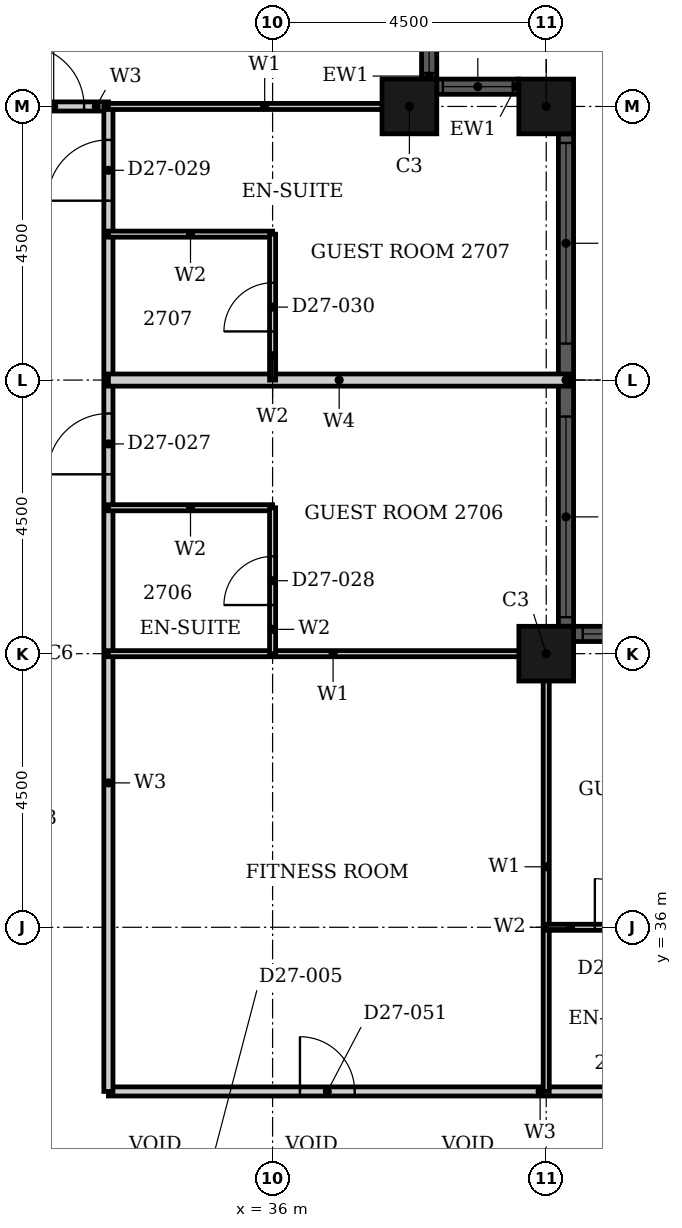
"""IFC4 building model, lengths in metres.
Left out: names, types, materials, properties, quantities, classifications, styles, units other than length and angle.
Written with IfcOpenShell. Run it as: python <this file> out.ifc"""

import sys

from ifc_helpers import new_model, si_unit, direction, frame, frame_2d, origin, origin_2d, place, context, subcontext, project, spatial, rectangle, hollow_rectangle, extrude, element, fill, save


model = new_model("IFC4")
c1 = context("Model", 3, precision=1e-05, world=origin(), true_north=direction((0.0, 1.0)))
c2 = subcontext(c1, "Body", "Model", "MODEL_VIEW")
j1 = project(units=[si_unit("LENGTHUNIT", "METRE"), si_unit("PLANEANGLEUNIT", "RADIAN")], contexts=[c1])
p1 = place(None, origin())
s1 = spatial("IfcSite", under=j1, at=p1, CompositionType="ELEMENT")
p2 = place(p1, origin())
s2 = spatial("IfcBuilding", under=s1, at=p2, CompositionType="ELEMENT")
p3 = place(p2, frame((0.0, 0.0, 111.6)))
s3 = spatial("IfcBuildingStorey", under=s2, at=p3, CompositionType="ELEMENT", Elevation=111.6)
for number, where, z_axis, x_axis in (
    (1, (40.5, 40.5, 0.0), (0.0, 0.0, 1.0), (1.0, 0.0, 0.0)),
    (2, (40.5, 49.5, 0.0), (0.0, 0.0, 1.0), (1.0, 0.0, 0.0)),
    (3, (38.25, 49.5, 0.0), (0.0, 0.0, 1.0), (1.0, 0.0, 0.0)),
):
    element("IfcColumn", number, at=place(p3, frame(where, z_axis=z_axis, x_axis=x_axis)), inside=s3, PredefinedType="COLUMN", context=c2, shape_type="SweptSolid", body=[
        extrude(hollow_rectangle(XDim=0.9, YDim=0.9, WallThickness=0.028, at=origin_2d()), origin(), (0.0, 0.0, 1.0), 3.6),
    ])
p4 = place(p3, frame((44.55, 40.825, 0.0), z_axis=(0.0, 0.0, 1.0), x_axis=(-1.0, 0.0, 0.0)))
e4 = element("IfcWall", 4, at=p4, inside=s3, PredefinedType="SOLIDWALL", context=c2, shape_type="SweptSolid", body=[
    extrude(rectangle(XDim=3.6, YDim=0.25, at=frame_2d((1.8, 0.0))), origin(), (0.0, 0.0, 1.0), 3.6),
])
p5 = place(p4, frame((0.15, 0.0, 0.9)))
e5 = element("IfcOpeningElement", 5, at=p5, cuts=e4, PredefinedType="OPENING", context=c2, shape_type="SweptSolid", body=[
    extrude(rectangle(XDim=3.3, YDim=2.08, at=frame_2d((1.65, 1.04))), frame((0.0, 0.135, 0.0), z_axis=(0.0, -1.0, 0.0), x_axis=(1.0, 0.0, 0.0)), (0.0, 0.0, 1.0), 0.27),
])
p6 = place(p3, frame((40.825, 40.95, 0.0), z_axis=(0.0, 0.0, 1.0), x_axis=(0.0, 1.0, 0.0)))
e6 = element("IfcWall", 6, at=p6, inside=s3, PredefinedType="SOLIDWALL", context=c2, shape_type="SweptSolid", body=[
    extrude(rectangle(XDim=8.1, YDim=0.25, at=frame_2d((4.05, 0.0))), origin(), (0.0, 0.0, 1.0), 3.6),
])
p7 = place(p6, frame((0.15, 0.0, 0.9)))
e7 = element("IfcOpeningElement", 7, at=p7, cuts=e6, PredefinedType="OPENING", context=c2, shape_type="SweptSolid", body=[
    extrude(rectangle(XDim=3.3, YDim=2.08, at=frame_2d((1.65, 1.04))), frame((0.0, 0.135, 0.0), z_axis=(0.0, -1.0, 0.0), x_axis=(1.0, 0.0, 0.0)), (0.0, 0.0, 1.0), 0.27),
])
p8 = place(p6, frame((4.65, 0.0, 0.9)))
e8 = element("IfcOpeningElement", 8, at=p8, cuts=e6, PredefinedType="OPENING", context=c2, shape_type="SweptSolid", body=[
    extrude(rectangle(XDim=3.3, YDim=2.08, at=frame_2d((1.65, 1.04))), frame((0.0, 0.135, 0.0), z_axis=(0.0, -1.0, 0.0), x_axis=(1.0, 0.0, 0.0)), (0.0, 0.0, 1.0), 0.27),
])
p9 = place(p3, frame((40.05, 49.825, 0.0), z_axis=(0.0, 0.0, 1.0), x_axis=(-1.0, 0.0, 0.0)))
e9 = element("IfcWall", 9, at=p9, inside=s3, PredefinedType="SOLIDWALL", context=c2, shape_type="SweptSolid", body=[
    extrude(rectangle(XDim=1.35, YDim=0.25, at=frame_2d((0.675, 0.0))), origin(), (0.0, 0.0, 1.0), 3.6),
])
p10 = place(p9, frame((0.1, 0.0, 0.9)))
e10 = element("IfcOpeningElement", 10, at=p10, cuts=e9, PredefinedType="OPENING", context=c2, shape_type="SweptSolid", body=[
    extrude(rectangle(XDim=1.15, YDim=2.08, at=frame_2d((0.575, 1.04))), frame((0.0, 0.135, 0.0), z_axis=(0.0, -1.0, 0.0), x_axis=(1.0, 0.0, 0.0)), (0.0, 0.0, 1.0), 0.27),
])
p11 = place(p3, frame((38.575, 49.95, 0.0), z_axis=(0.0, 0.0, 1.0), x_axis=(0.0, 1.0, 0.0)))
e11 = element("IfcWall", 11, at=p11, inside=s3, PredefinedType="SOLIDWALL", context=c2, shape_type="SweptSolid", body=[
    extrude(rectangle(XDim=1.35, YDim=0.25, at=frame_2d((0.675, 0.0))), origin(), (0.0, 0.0, 1.0), 3.6),
])
p12 = place(p11, frame((0.1, 0.0, 0.9)))
e12 = element("IfcOpeningElement", 12, at=p12, cuts=e11, PredefinedType="OPENING", context=c2, shape_type="SweptSolid", body=[
    extrude(rectangle(XDim=1.15, YDim=2.08, at=frame_2d((0.575, 1.04))), frame((0.0, 0.135, 0.0), z_axis=(0.0, -1.0, 0.0), x_axis=(1.0, 0.0, 0.0)), (0.0, 0.0, 1.0), 0.27),
])
p13 = place(p3, frame((33.3, 33.3, 0.0), z_axis=(0.0, 0.0, 1.0), x_axis=(1.0, 0.0, 0.0)))
e13 = element("IfcWall", 13, at=p13, inside=s3, PredefinedType="PARTITIONING", context=c2, shape_type="SweptSolid", body=[
    extrude(rectangle(XDim=11.7, YDim=0.15, at=frame_2d((5.85, 0.0))), origin(), (0.0, 0.0, 1.0), 3.3),
])
p14 = place(p13, frame((10.15, 0.0, 0.0)))
e14 = element("IfcOpeningElement", 14, at=p14, cuts=e13, PredefinedType="OPENING", context=c2, shape_type="SweptSolid", body=[
    extrude(rectangle(XDim=1.0, YDim=2.1, at=frame_2d((0.5, 1.05))), frame((0.0, 0.085, 0.0), z_axis=(0.0, -1.0, 0.0), x_axis=(1.0, 0.0, 0.0)), (0.0, 0.0, 1.0), 0.17),
])
p15 = place(p13, frame((3.15, 0.0, 0.0)))
e15 = element("IfcOpeningElement", 15, at=p15, cuts=e13, PredefinedType="OPENING", context=c2, shape_type="SweptSolid", body=[
    extrude(rectangle(XDim=0.9, YDim=2.1, at=frame_2d((0.45, 1.05))), frame((0.0, 0.085, 0.0), z_axis=(0.0, -1.0, 0.0), x_axis=(1.0, 0.0, 0.0)), (0.0, 0.0, 1.0), 0.17),
])
p16 = place(p3, frame((31.5, 49.5, 0.0), z_axis=(0.0, 0.0, 1.0), x_axis=(1.0, 0.0, 0.0)))
e16 = element("IfcWall", 16, at=p16, inside=s3, PredefinedType="PARTITIONING", context=c2, shape_type="SweptSolid", body=[
    extrude(rectangle(XDim=1.8, YDim=0.15, at=frame_2d((0.9, 0.0))), origin(), (0.0, 0.0, 1.0), 3.3),
])
p17 = place(p16, frame((0.4, 0.0, 0.0)))
e17 = element("IfcOpeningElement", 17, at=p17, cuts=e16, PredefinedType="OPENING", context=c2, shape_type="SweptSolid", body=[
    extrude(rectangle(XDim=1.0, YDim=2.1, at=frame_2d((0.5, 1.05))), frame((0.0, 0.085, 0.0), z_axis=(0.0, -1.0, 0.0), x_axis=(1.0, 0.0, 0.0)), (0.0, 0.0, 1.0), 0.17),
])
p18 = place(p3, frame((33.3, 33.3, 0.0), z_axis=(0.0, 0.0, 1.0), x_axis=(0.0, 1.0, 0.0)))
e18 = element("IfcWall", 18, at=p18, inside=s3, PredefinedType="PARTITIONING", context=c2, shape_type="SweptSolid", body=[
    extrude(rectangle(XDim=16.2, YDim=0.15, at=frame_2d((8.1, 0.0))), origin(), (0.0, 0.0, 1.0), 3.3),
])
p19 = place(p18, frame((10.15, 0.0, 0.0)))
e19 = element("IfcOpeningElement", 19, at=p19, cuts=e18, PredefinedType="OPENING", context=c2, shape_type="SweptSolid", body=[
    extrude(rectangle(XDim=1.0, YDim=2.1, at=frame_2d((0.5, 1.05))), frame((0.0, 0.085, 0.0), z_axis=(0.0, -1.0, 0.0), x_axis=(1.0, 0.0, 0.0)), (0.0, 0.0, 1.0), 0.17),
])
p20 = place(p18, frame((14.65, 0.0, 0.0)))
e20 = element("IfcOpeningElement", 20, at=p20, cuts=e18, PredefinedType="OPENING", context=c2, shape_type="SweptSolid", body=[
    extrude(rectangle(XDim=1.0, YDim=2.1, at=frame_2d((0.5, 1.05))), frame((0.0, 0.085, 0.0), z_axis=(0.0, -1.0, 0.0), x_axis=(1.0, 0.0, 0.0)), (0.0, 0.0, 1.0), 0.17),
])
p21 = place(p3, frame((33.3, 40.5, 0.0), z_axis=(0.0, 0.0, 1.0), x_axis=(1.0, 0.0, 0.0)))
e21 = element("IfcWall", 21, at=p21, inside=s3, PredefinedType="PARTITIONING", context=c2, shape_type="SweptSolid", body=[
    extrude(rectangle(XDim=7.39, YDim=0.1, at=frame_2d((3.695, 0.0))), origin(), (0.0, 0.0, 1.0), 2.38),
])
p22 = place(p3, frame((33.3, 49.5, 0.0), z_axis=(0.0, 0.0, 1.0), x_axis=(1.0, 0.0, 0.0)))
e22 = element("IfcWall", 22, at=p22, inside=s3, PredefinedType="PARTITIONING", context=c2, shape_type="SweptSolid", body=[
    extrude(rectangle(XDim=5.14, YDim=0.1, at=frame_2d((2.57, 0.0))), origin(), (0.0, 0.0, 1.0), 3.3),
])
p23 = place(p3, frame((40.5, 33.3, 0.0), z_axis=(0.0, 0.0, 1.0), x_axis=(0.0, 1.0, 0.0)))
e23 = element("IfcWall", 23, at=p23, inside=s3, PredefinedType="PARTITIONING", context=c2, shape_type="SweptSolid", body=[
    extrude(rectangle(XDim=7.39, YDim=0.1, at=frame_2d((3.695, 0.0))), origin(), (0.0, 0.0, 1.0), 3.3),
])
p24 = place(p3, frame((33.3, 45.0, 0.0), z_axis=(0.0, 0.0, 1.0), x_axis=(1.0, 0.0, 0.0)))
e24 = element("IfcWall", 24, at=p24, inside=s3, PredefinedType="PARTITIONING", context=c2, shape_type="SweptSolid", body=[
    extrude(rectangle(XDim=7.59, YDim=0.2, at=frame_2d((3.795, 0.0))), origin(), (0.0, 0.0, 1.0), 3.3),
])
p25 = place(p3, frame((40.5, 36.0, 0.0), z_axis=(0.0, 0.0, 1.0), x_axis=(1.0, 0.0, 0.0)))
e25 = element("IfcWall", 25, at=p25, inside=s3, PredefinedType="PARTITIONING", context=c2, shape_type="SweptSolid", body=[
    extrude(rectangle(XDim=2.4, YDim=0.1, at=frame_2d((1.2, 0.0))), origin(), (0.0, 0.0, 1.0), 3.3),
])
p26 = place(p25, frame((0.8, 0.0, 0.0)))
e26 = element("IfcOpeningElement", 26, at=p26, cuts=e25, PredefinedType="OPENING", context=c2, shape_type="SweptSolid", body=[
    extrude(rectangle(XDim=0.8, YDim=2.1, at=frame_2d((0.4, 1.05))), frame((0.0, 0.06, 0.0), z_axis=(0.0, -1.0, 0.0), x_axis=(1.0, 0.0, 0.0)), (0.0, 0.0, 1.0), 0.12),
])
for number, where, z_axis, x_axis in (
    (27, (33.3, 42.9, 0.0), (0.0, 0.0, 1.0), (1.0, 0.0, 0.0)),
    (28, (33.3, 47.4, 0.0), (0.0, 0.0, 1.0), (1.0, 0.0, 0.0)),
):
    element("IfcWall", number, at=place(p3, frame(where, z_axis=z_axis, x_axis=x_axis)), inside=s3, PredefinedType="PARTITIONING", context=c2, shape_type="SweptSolid", body=[
        extrude(rectangle(XDim=2.7, YDim=0.1, at=frame_2d((1.35, 0.0))), origin(), (0.0, 0.0, 1.0), 3.3),
    ])
p27 = place(p3, frame((36.0, 40.5, 0.0), z_axis=(0.0, 0.0, 1.0), x_axis=(0.0, 1.0, 0.0)))
e29 = element("IfcWall", 29, at=p27, inside=s3, PredefinedType="PARTITIONING", context=c2, shape_type="SweptSolid", body=[
    extrude(rectangle(XDim=2.4, YDim=0.1, at=frame_2d((1.2, 0.0))), origin(), (0.0, 0.0, 1.0), 2.58),
])
p28 = place(p27, frame((0.8, 0.0, 0.0)))
e30 = element("IfcOpeningElement", 30, at=p28, cuts=e29, PredefinedType="OPENING", context=c2, shape_type="SweptSolid", body=[
    extrude(rectangle(XDim=0.8, YDim=2.1, at=frame_2d((0.4, 1.05))), frame((0.0, 0.06, 0.0), z_axis=(0.0, -1.0, 0.0), x_axis=(1.0, 0.0, 0.0)), (0.0, 0.0, 1.0), 0.12),
])
p29 = place(p3, frame((36.0, 45.0, 0.0), z_axis=(0.0, 0.0, 1.0), x_axis=(0.0, 1.0, 0.0)))
e31 = element("IfcWall", 31, at=p29, inside=s3, PredefinedType="PARTITIONING", context=c2, shape_type="SweptSolid", body=[
    extrude(rectangle(XDim=2.4, YDim=0.1, at=frame_2d((1.2, 0.0))), origin(), (0.0, 0.0, 1.0), 2.58),
])
p30 = place(p29, frame((0.8, 0.0, 0.0)))
e32 = element("IfcOpeningElement", 32, at=p30, cuts=e31, PredefinedType="OPENING", context=c2, shape_type="SweptSolid", body=[
    extrude(rectangle(XDim=0.8, YDim=2.1, at=frame_2d((0.4, 1.05))), frame((0.0, 0.06, 0.0), z_axis=(0.0, -1.0, 0.0), x_axis=(1.0, 0.0, 0.0)), (0.0, 0.0, 1.0), 0.12),
])
p31 = place(p5, origin())
e33 = element("IfcWindow", 33, at=p31, inside=s3, PartitioningType="SINGLE_PANEL", PredefinedType="WINDOW", context=c2, shape_type="SweptSolid", body=[
    extrude(rectangle(XDim=3.3, YDim=2.08, at=frame_2d((1.65, 1.04))), frame((0.0, 0.03, 0.0), z_axis=(0.0, -1.0, 0.0), x_axis=(1.0, 0.0, 0.0)), (0.0, 0.0, 1.0), 0.06),
])
fill(e5, e33)
p32 = place(p7, origin())
e34 = element("IfcWindow", 34, at=p32, inside=s3, PartitioningType="SINGLE_PANEL", PredefinedType="WINDOW", context=c2, shape_type="SweptSolid", body=[
    extrude(rectangle(XDim=3.3, YDim=2.08, at=frame_2d((1.65, 1.04))), frame((0.0, 0.03, 0.0), z_axis=(0.0, -1.0, 0.0), x_axis=(1.0, 0.0, 0.0)), (0.0, 0.0, 1.0), 0.06),
])
fill(e7, e34)
p33 = place(p8, origin())
e35 = element("IfcWindow", 35, at=p33, inside=s3, PartitioningType="SINGLE_PANEL", PredefinedType="WINDOW", context=c2, shape_type="SweptSolid", body=[
    extrude(rectangle(XDim=3.3, YDim=2.08, at=frame_2d((1.65, 1.04))), frame((0.0, 0.03, 0.0), z_axis=(0.0, -1.0, 0.0), x_axis=(1.0, 0.0, 0.0)), (0.0, 0.0, 1.0), 0.06),
])
fill(e8, e35)
p34 = place(p10, origin())
e36 = element("IfcWindow", 36, at=p34, inside=s3, PartitioningType="SINGLE_PANEL", PredefinedType="WINDOW", context=c2, shape_type="SweptSolid", body=[
    extrude(rectangle(XDim=1.15, YDim=2.08, at=frame_2d((0.575, 1.04))), frame((0.0, 0.03, 0.0), z_axis=(0.0, -1.0, 0.0), x_axis=(1.0, 0.0, 0.0)), (0.0, 0.0, 1.0), 0.06),
])
fill(e10, e36)
p35 = place(p12, origin())
e37 = element("IfcWindow", 37, at=p35, inside=s3, PartitioningType="SINGLE_PANEL", PredefinedType="WINDOW", context=c2, shape_type="SweptSolid", body=[
    extrude(rectangle(XDim=1.15, YDim=2.08, at=frame_2d((0.575, 1.04))), frame((0.0, 0.03, 0.0), z_axis=(0.0, -1.0, 0.0), x_axis=(1.0, 0.0, 0.0)), (0.0, 0.0, 1.0), 0.06),
])
fill(e12, e37)
p36 = place(p19, origin())
e38 = element("IfcDoor", 38, at=p36, inside=s3, OperationType="SINGLE_SWING_RIGHT", PredefinedType="DOOR", context=c2, shape_type="SweptSolid", body=[
    extrude(rectangle(XDim=1.0, YDim=2.1, at=frame_2d((0.5, 1.05))), frame((0.0, 0.025, 0.0), z_axis=(0.0, -1.0, 0.0), x_axis=(1.0, 0.0, 0.0)), (0.0, 0.0, 1.0), 0.05),
])
fill(e19, e38)
p37 = place(p28, origin())
e39 = element("IfcDoor", 39, at=p37, inside=s3, OperationType="SINGLE_SWING_LEFT", PredefinedType="DOOR", context=c2, shape_type="SweptSolid", body=[
    extrude(rectangle(XDim=0.8, YDim=2.1, at=frame_2d((0.4, 1.05))), frame((0.0, 0.025, 0.0), z_axis=(0.0, -1.0, 0.0), x_axis=(1.0, 0.0, 0.0)), (0.0, 0.0, 1.0), 0.05),
])
fill(e30, e39)
p38 = place(p20, origin())
e40 = element("IfcDoor", 40, at=p38, inside=s3, OperationType="SINGLE_SWING_RIGHT", PredefinedType="DOOR", context=c2, shape_type="SweptSolid", body=[
    extrude(rectangle(XDim=1.0, YDim=2.1, at=frame_2d((0.5, 1.05))), frame((0.0, 0.025, 0.0), z_axis=(0.0, -1.0, 0.0), x_axis=(1.0, 0.0, 0.0)), (0.0, 0.0, 1.0), 0.05),
])
fill(e20, e40)
p39 = place(p30, origin())
e41 = element("IfcDoor", 41, at=p39, inside=s3, OperationType="SINGLE_SWING_RIGHT", PredefinedType="DOOR", context=c2, shape_type="SweptSolid", body=[
    extrude(rectangle(XDim=0.8, YDim=2.1, at=frame_2d((0.4, 1.05))), frame((0.0, 0.025, 0.0), z_axis=(0.0, -1.0, 0.0), x_axis=(1.0, 0.0, 0.0)), (0.0, 0.0, 1.0), 0.05),
])
fill(e32, e41)
p40 = place(p17, origin())
e42 = element("IfcDoor", 42, at=p40, inside=s3, OperationType="SINGLE_SWING_LEFT", PredefinedType="DOOR", context=c2, shape_type="SweptSolid", body=[
    extrude(rectangle(XDim=1.0, YDim=2.1, at=frame_2d((0.5, 1.05))), frame((0.0, 0.025, 0.0), z_axis=(0.0, -1.0, 0.0), x_axis=(1.0, 0.0, 0.0)), (0.0, 0.0, 1.0), 0.05),
])
fill(e17, e42)
p41 = place(p26, origin())
e43 = element("IfcDoor", 43, at=p41, inside=s3, OperationType="SINGLE_SWING_LEFT", PredefinedType="DOOR", context=c2, shape_type="SweptSolid", body=[
    extrude(rectangle(XDim=0.8, YDim=2.1, at=frame_2d((0.4, 1.05))), frame((0.0, 0.025, 0.0), z_axis=(0.0, -1.0, 0.0), x_axis=(1.0, 0.0, 0.0)), (0.0, 0.0, 1.0), 0.05),
])
fill(e26, e43)
p42 = place(p15, origin())
e44 = element("IfcDoor", 44, at=p42, inside=s3, OperationType="SINGLE_SWING_RIGHT", PredefinedType="DOOR", context=c2, shape_type="SweptSolid", body=[
    extrude(rectangle(XDim=0.9, YDim=2.1, at=frame_2d((0.45, 1.05))), frame((0.0, 0.025, 0.0), z_axis=(0.0, -1.0, 0.0), x_axis=(1.0, 0.0, 0.0)), (0.0, 0.0, 1.0), 0.05),
])
fill(e15, e44)
save(model, sys.argv[1])
